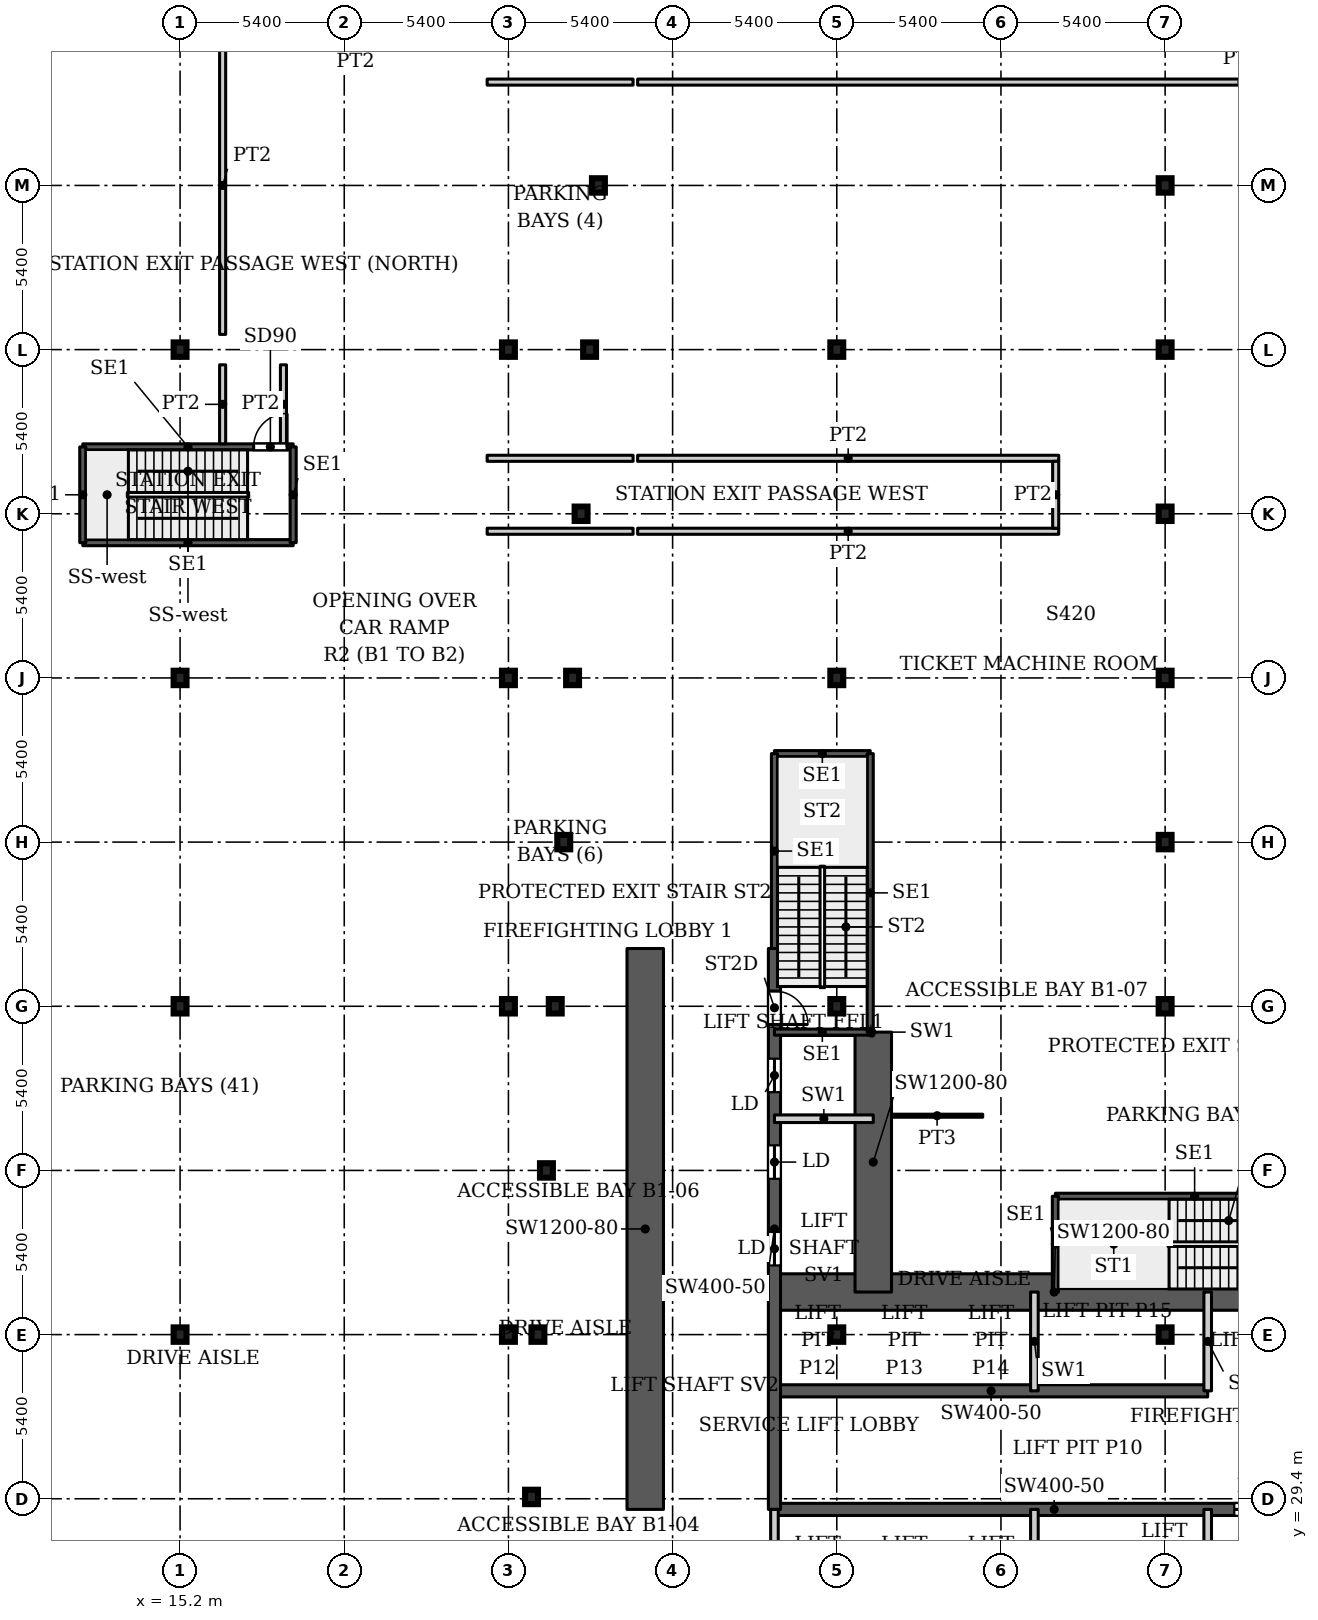
"""IFC4 building model, lengths in metres.
Left out: names, types, materials, properties, quantities, classifications, styles, units other than length and angle.
Written with IfcOpenShell. Run it as: python <this file> out.ifc"""

import sys

from ifc_helpers import new_model, si_unit, direction, frame, frame_2d, origin, origin_2d, place, context, subcontext, project, spatial, rectangle, i_section, extrude, source, transform, mapped, element, fill, save


model = new_model("IFC4")
c1 = context("Model", 3, precision=1e-05, world=origin(), true_north=direction((0.0, 1.0)))
c2 = subcontext(c1, "Body", "Model", "MODEL_VIEW")
j1 = project(units=[si_unit("LENGTHUNIT", "METRE"), si_unit("PLANEANGLEUNIT", "RADIAN")], contexts=[c1])
p1 = place(None, origin())
s1 = spatial("IfcSite", under=j1, at=p1, CompositionType="ELEMENT")
p2 = place(p1, origin())
s2 = spatial("IfcBuilding", under=s1, at=p2, CompositionType="ELEMENT")
p3 = place(p2, frame((0.0, 0.0, -5.0)))
s3 = spatial("IfcBuildingStorey", under=s2, at=p3, CompositionType="ELEMENT", Elevation=-5.0)
for number, where, z_axis, x_axis in (
    (1, (15.2, 34.8, 0.0), (0.0, 0.0, 1.0), (1.0, 0.0, 0.0)),
    (2, (26.0, 34.8, 0.0), (0.0, 0.0, 1.0), (1.0, 0.0, 0.0)),
    (3, (36.8, 34.8, 0.0), (0.0, 0.0, 1.0), (1.0, 0.0, 0.0)),
    (4, (47.6, 34.8, 0.0), (0.0, 0.0, 1.0), (1.0, 0.0, 0.0)),
    (5, (15.2, 45.6, 0.0), (0.0, 0.0, 1.0), (1.0, 0.0, 0.0)),
    (6, (26.0, 45.6, 0.0), (0.0, 0.0, 1.0), (1.0, 0.0, 0.0)),
    (7, (36.8, 45.6, 0.0), (0.0, 0.0, 1.0), (1.0, 0.0, 0.0)),
    (8, (47.6, 45.6, 0.0), (0.0, 0.0, 1.0), (1.0, 0.0, 0.0)),
    (9, (15.2, 56.4, 0.0), (0.0, 0.0, 1.0), (1.0, 0.0, 0.0)),
    (10, (26.0, 56.4, 0.0), (0.0, 0.0, 1.0), (1.0, 0.0, 0.0)),
    (11, (36.8, 56.4, 0.0), (0.0, 0.0, 1.0), (1.0, 0.0, 0.0)),
    (12, (47.6, 56.4, 0.0), (0.0, 0.0, 1.0), (1.0, 0.0, 0.0)),
    (13, (15.2, 67.2, 0.0), (0.0, 0.0, 1.0), (1.0, 0.0, 0.0)),
    (14, (26.0, 67.2, 0.0), (0.0, 0.0, 1.0), (1.0, 0.0, 0.0)),
    (15, (36.8, 67.2, 0.0), (0.0, 0.0, 1.0), (1.0, 0.0, 0.0)),
    (16, (47.6, 67.2, 0.0), (0.0, 0.0, 1.0), (1.0, 0.0, 0.0)),
    (17, (26.76, 29.46, 0.0), (0.0, 0.0, 1.0), (1.0, 0.0, 0.0)),
    (18, (26.97, 34.8, 0.0), (0.0, 0.0, 1.0), (1.0, 0.0, 0.0)),
    (19, (27.25, 40.2, 0.0), (0.0, 0.0, 1.0), (1.0, 0.0, 0.0)),
    (20, (27.54, 45.6, 0.0), (0.0, 0.0, 1.0), (1.0, 0.0, 0.0)),
    (21, (27.82, 51.0, 0.0), (0.0, 0.0, 1.0), (1.0, 0.0, 0.0)),
    (22, (47.6, 51.0, 0.0), (0.0, 0.0, 1.0), (1.0, 0.0, 0.0)),
    (23, (28.11, 56.4, 0.0), (0.0, 0.0, 1.0), (1.0, 0.0, 0.0)),
    (24, (28.39, 61.8, 0.0), (0.0, 0.0, 1.0), (1.0, 0.0, 0.0)),
    (25, (47.6, 61.8, 0.0), (0.0, 0.0, 1.0), (1.0, 0.0, 0.0)),
    (26, (28.67, 67.2, 0.0), (0.0, 0.0, 1.0), (1.0, 0.0, 0.0)),
    (27, (28.96, 72.6, 0.0), (0.0, 0.0, 1.0), (1.0, 0.0, 0.0)),
    (28, (47.6, 72.6, 0.0), (0.0, 0.0, 1.0), (1.0, 0.0, 0.0)),
):
    element("IfcColumn", number, at=place(p3, frame(where, z_axis=z_axis, x_axis=x_axis)), inside=s3, PredefinedType="COLUMN", context=c2, shape_type="SweptSolid", body=[
        extrude(i_section(OverallWidth=0.424, OverallDepth=0.474, WebThickness=0.048, FlangeThickness=0.077, FilletRadius=0.014, at=origin_2d()), origin(), (0.0, 0.0, 1.0), 5.0),
    ])
p4 = place(p3, frame((34.75, 29.05, 0.0), z_axis=(0.0, 0.0, 1.0), x_axis=(1.0, 0.0, 0.0)))
e29 = element("IfcWall", 29, at=p4, inside=s3, PredefinedType="SHEAR", context=c2, shape_type="SweptSolid", body=[
    extrude(rectangle(XDim=18.4, YDim=0.4, at=frame_2d((9.2, 0.0))), origin(), (0.0, 0.0, 1.0), 5.0),
])
p5 = place(p4, frame((15.125, 0.0, 0.0)))
e30 = element("IfcOpeningElement", 30, at=p5, cuts=e29, PredefinedType="OPENING", context=c2, shape_type="SweptSolid", body=[
    extrude(rectangle(XDim=1.1, YDim=2.2, at=frame_2d((0.55, 1.1))), frame((0.0, 0.21, 0.0), z_axis=(0.0, -1.0, 0.0), x_axis=(1.0, 0.0, 0.0)), (0.0, 0.0, 1.0), 0.42),
])
p6 = place(p3, frame((34.75, 32.95, 0.0), z_axis=(0.0, 0.0, 1.0), x_axis=(1.0, 0.0, 0.0)))
e31 = element("IfcWall", 31, at=p6, inside=s3, PredefinedType="SHEAR", context=c2, shape_type="SweptSolid", body=[
    extrude(rectangle(XDim=14.25, YDim=0.4, at=frame_2d((7.125, 0.0))), origin(), (0.0, 0.0, 1.0), 5.0),
])
p7 = place(p3, frame((34.75, 36.2, 0.0), z_axis=(0.0, 0.0, 1.0), x_axis=(1.0, 0.0, 0.0)))
e32 = element("IfcWall", 32, at=p7, inside=s3, PredefinedType="SHEAR", context=c2, shape_type="SweptSolid", body=[
    extrude(rectangle(XDim=18.4, YDim=1.2, at=frame_2d((9.2, 0.0))), origin(), (0.0, 0.0, 1.0), 5.0),
])
p8 = place(p7, frame((16.955, 0.0, 0.0)))
e33 = element("IfcOpeningElement", 33, at=p8, cuts=e32, PredefinedType="OPENING", context=c2, shape_type="SweptSolid", body=[
    extrude(rectangle(XDim=0.843, YDim=2.2, at=frame_2d((0.421, 1.1))), frame((0.0, 0.61, 0.0), z_axis=(0.0, -1.0, 0.0), x_axis=(1.0, 0.0, 0.0)), (0.0, 0.0, 1.0), 1.22),
])
p9 = place(p3, frame((34.75, 29.05, 0.0), z_axis=(0.0, 0.0, 1.0), x_axis=(0.0, 1.0, 0.0)))
e34 = element("IfcWall", 34, at=p9, inside=s3, PredefinedType="SHEAR", context=c2, shape_type="SweptSolid", body=[
    extrude(rectangle(XDim=18.45, YDim=0.4, at=frame_2d((9.225, 0.0))), origin(), (0.0, 0.0, 1.0), 5.0),
])
p10 = place(p9, frame((8.025, 0.0, 0.0)))
e35 = element("IfcOpeningElement", 35, at=p10, cuts=e34, PredefinedType="OPENING", context=c2, shape_type="SweptSolid", body=[
    extrude(rectangle(XDim=1.1, YDim=2.2, at=frame_2d((0.55, 1.1))), frame((0.0, 0.21, 0.0), z_axis=(0.0, -1.0, 0.0), x_axis=(1.0, 0.0, 0.0)), (0.0, 0.0, 1.0), 0.42),
])
p11 = place(p9, frame((10.875, 0.0, 0.0)))
e36 = element("IfcOpeningElement", 36, at=p11, cuts=e34, PredefinedType="OPENING", context=c2, shape_type="SweptSolid", body=[
    extrude(rectangle(XDim=1.1, YDim=2.2, at=frame_2d((0.55, 1.1))), frame((0.0, 0.21, 0.0), z_axis=(0.0, -1.0, 0.0), x_axis=(1.0, 0.0, 0.0)), (0.0, 0.0, 1.0), 0.42),
])
p12 = place(p9, frame((13.725, 0.0, 0.0)))
e37 = element("IfcOpeningElement", 37, at=p12, cuts=e34, PredefinedType="OPENING", context=c2, shape_type="SweptSolid", body=[
    extrude(rectangle(XDim=1.1, YDim=2.2, at=frame_2d((0.55, 1.1))), frame((0.0, 0.21, 0.0), z_axis=(0.0, -1.0, 0.0), x_axis=(1.0, 0.0, 0.0)), (0.0, 0.0, 1.0), 0.42),
])
p13 = place(p9, frame((15.95, 0.0, 0.0)))
e38 = element("IfcOpeningElement", 38, at=p13, cuts=e34, PredefinedType="OPENING", context=c2, shape_type="SweptSolid", body=[
    extrude(rectangle(XDim=1.1, YDim=2.2, at=frame_2d((0.55, 1.1))), frame((0.0, 0.21, 0.0), z_axis=(0.0, -1.0, 0.0), x_axis=(1.0, 0.0, 0.0)), (0.0, 0.0, 1.0), 0.42),
])
p14 = place(p3, frame((38.0, 36.2, 0.0), z_axis=(0.0, 0.0, 1.0), x_axis=(0.0, 1.0, 0.0)))
e39 = element("IfcWall", 39, at=p14, inside=s3, PredefinedType="SHEAR", context=c2, shape_type="SweptSolid", body=[
    extrude(rectangle(XDim=8.55, YDim=1.2, at=frame_2d((4.275, 0.0))), origin(), (0.0, 0.0, 1.0), 5.0),
])
p15 = place(p3, frame((30.5, 29.05, 0.0), z_axis=(0.0, 0.0, 1.0), x_axis=(0.0, 1.0, 0.0)))
e40 = element("IfcWall", 40, at=p15, inside=s3, PredefinedType="SHEAR", context=c2, shape_type="SweptSolid", body=[
    extrude(rectangle(XDim=18.45, YDim=1.2, at=frame_2d((9.225, 0.0))), origin(), (0.0, 0.0, 1.0), 5.0),
])
p16 = place(p3, frame((43.99, 39.35, 0.0), z_axis=(0.0, 0.0, 1.0), x_axis=(1.0, 0.0, 0.0)))
e41 = element("IfcWall", 41, at=p16, inside=s3, PredefinedType="SHEAR", context=c2, shape_type="SweptSolid", body=[
    extrude(rectangle(XDim=9.16, YDim=0.2, at=frame_2d((4.58, 0.0))), origin(), (0.0, 0.0, 1.0), 5.0),
])
p17 = place(p3, frame((43.99, 36.2, 0.0), z_axis=(0.0, 0.0, 1.0), x_axis=(0.0, 1.0, 0.0)))
e42 = element("IfcWall", 42, at=p17, inside=s3, PredefinedType="SHEAR", context=c2, shape_type="SweptSolid", body=[
    extrude(rectangle(XDim=3.15, YDim=0.2, at=frame_2d((1.575, 0.0))), origin(), (0.0, 0.0, 1.0), 5.0),
])
for number, where, z_axis, x_axis in (
    (43, (34.75, 44.75, 0.0), (0.0, 0.0, 1.0), (1.0, 0.0, 0.0)),
    (44, (34.75, 53.91, 0.0), (0.0, 0.0, 1.0), (1.0, 0.0, 0.0)),
):
    element("IfcWall", number, at=place(p3, frame(where, z_axis=z_axis, x_axis=x_axis)), inside=s3, PredefinedType="SHEAR", context=c2, shape_type="SweptSolid", body=[
        extrude(rectangle(XDim=3.15, YDim=0.2, at=frame_2d((1.575, 0.0))), origin(), (0.0, 0.0, 1.0), 5.0),
    ])
p18 = place(p3, frame((34.75, 47.5, 0.0), z_axis=(0.0, 0.0, 1.0), x_axis=(0.0, 1.0, 0.0)))
e45 = element("IfcWall", 45, at=p18, inside=s3, PredefinedType="SHEAR", context=c2, shape_type="SweptSolid", body=[
    extrude(rectangle(XDim=6.41, YDim=0.2, at=frame_2d((3.205, 0.0))), origin(), (0.0, 0.0, 1.0), 5.0),
])
p19 = place(p3, frame((37.9, 44.75, 0.0), z_axis=(0.0, 0.0, 1.0), x_axis=(0.0, 1.0, 0.0)))
e46 = element("IfcWall", 46, at=p19, inside=s3, PredefinedType="SHEAR", context=c2, shape_type="SweptSolid", body=[
    extrude(rectangle(XDim=9.16, YDim=0.2, at=frame_2d((4.58, 0.0))), origin(), (0.0, 0.0, 1.0), 5.0),
])
for number, where, z_axis, x_axis in (
    (47, (34.75, 25.8, 0.0), (0.0, 0.0, 1.0), (0.0, 1.0, 0.0)),
    (48, (43.3, 25.8, 0.0), (0.0, 0.0, 1.0), (0.0, 1.0, 0.0)),
    (49, (43.3, 32.95, 0.0), (0.0, 0.0, 1.0), (0.0, 1.0, 0.0)),
    (50, (49.0, 25.8, 0.0), (0.0, 0.0, 1.0), (0.0, 1.0, 0.0)),
    (51, (49.0, 32.95, 0.0), (0.0, 0.0, 1.0), (0.0, 1.0, 0.0)),
    (52, (34.75, 41.9, 0.0), (0.0, 0.0, 1.0), (1.0, 0.0, 0.0)),
):
    element("IfcWall", number, at=place(p3, frame(where, z_axis=z_axis, x_axis=x_axis)), inside=s3, PredefinedType="PARTITIONING", context=c2, shape_type="SweptSolid", body=[
        extrude(rectangle(XDim=3.25, YDim=0.25, at=frame_2d((1.625, 0.0))), origin(), (0.0, 0.0, 1.0), 5.0),
    ])
p20 = place(p3, frame((37.9, 44.75, 0.0), z_axis=(0.0, 0.0, 1.0), x_axis=(1.0, 0.0, 0.0)))
e53 = element("IfcWall", 53, at=p20, inside=s3, PredefinedType="PARTITIONING", context=c2, shape_type="SweptSolid", body=[
    extrude(rectangle(XDim=0.1, YDim=0.25, at=frame_2d((0.05, 0.0))), origin(), (0.0, 0.0, 1.0), 5.0),
])
p21 = place(p3, frame((12.0, 60.85, 0.0), z_axis=(0.0, 0.0, 1.0), x_axis=(1.0, 0.0, 0.0)))
e54 = element("IfcWall", 54, at=p21, inside=s3, PredefinedType="SHEAR", context=c2, shape_type="SweptSolid", body=[
    extrude(rectangle(XDim=6.92, YDim=0.2, at=frame_2d((3.46, 0.0))), origin(), (0.0, 0.0, 1.0), 5.0),
])
p22 = place(p3, frame((12.0, 64.0, 0.0), z_axis=(0.0, 0.0, 1.0), x_axis=(1.0, 0.0, 0.0)))
e55 = element("IfcWall", 55, at=p22, inside=s3, PredefinedType="SHEAR", context=c2, shape_type="SweptSolid", body=[
    extrude(rectangle(XDim=6.92, YDim=0.2, at=frame_2d((3.46, 0.0))), origin(), (0.0, 0.0, 1.0), 5.0),
])
p23 = place(p22, frame((5.62, 0.0, 0.0)))
e56 = element("IfcOpeningElement", 56, at=p23, cuts=e55, PredefinedType="OPENING", context=c2, shape_type="SweptSolid", body=[
    extrude(rectangle(XDim=1.1, YDim=2.2, at=frame_2d((0.55, 1.1))), frame((0.0, 0.11, 0.0), z_axis=(0.0, -1.0, 0.0), x_axis=(1.0, 0.0, 0.0)), (0.0, 0.0, 1.0), 0.22),
])
for number, where, z_axis, x_axis in (
    (57, (12.0, 60.85, 0.0), (0.0, 0.0, 1.0), (0.0, 1.0, 0.0)),
    (58, (18.92, 60.85, 0.0), (0.0, 0.0, 1.0), (0.0, 1.0, 0.0)),
):
    element("IfcWall", number, at=place(p3, frame(where, z_axis=z_axis, x_axis=x_axis)), inside=s3, PredefinedType="SHEAR", context=c2, shape_type="SweptSolid", body=[
        extrude(rectangle(XDim=3.15, YDim=0.2, at=frame_2d((1.575, 0.0))), origin(), (0.0, 0.0, 1.0), 5.0),
    ])
p24 = place(p3, frame((16.6, 64.1, 0.0), z_axis=(0.0, 0.0, 1.0), x_axis=(0.0, 1.0, 0.0)))
e59 = element("IfcWall", 59, at=p24, inside=s3, PredefinedType="PARTITIONING", context=c2, shape_type="SweptSolid", body=[
    extrude(rectangle(XDim=2.6, YDim=0.2, at=frame_2d((1.3, 0.0))), origin(), (0.0, 0.0, 1.0), 4.58),
])
p25 = place(p3, frame((16.6, 67.7, 0.0), z_axis=(0.0, 0.0, 1.0), x_axis=(0.0, 1.0, 0.0)))
e60 = element("IfcWall", 60, at=p25, inside=s3, PredefinedType="PARTITIONING", context=c2, shape_type="SweptSolid", body=[
    extrude(rectangle(XDim=9.8, YDim=0.2, at=frame_2d((4.9, 0.0))), origin(), (0.0, 0.0, 1.0), 4.58),
])
p26 = place(p3, frame((18.6, 64.1, 0.0), z_axis=(0.0, 0.0, 1.0), x_axis=(0.0, 1.0, 0.0)))
e61 = element("IfcWall", 61, at=p26, inside=s3, PredefinedType="PARTITIONING", context=c2, shape_type="SweptSolid", body=[
    extrude(rectangle(XDim=2.6, YDim=0.2, at=frame_2d((1.3, 0.0))), origin(), (0.0, 0.0, 1.0), 4.58),
])
for number, where, z_axis, x_axis in (
    (62, (25.3, 61.225, 0.0), (0.0, 0.0, 1.0), (1.0, 0.0, 0.0)),
    (63, (25.3, 63.625, 0.0), (0.0, 0.0, 1.0), (1.0, 0.0, 0.0)),
    (64, (25.3, 76.0, 0.0), (0.0, 0.0, 1.0), (1.0, 0.0, 0.0)),
):
    element("IfcWall", number, at=place(p3, frame(where, z_axis=z_axis, x_axis=x_axis)), inside=s3, PredefinedType="PARTITIONING", context=c2, shape_type="SweptSolid", body=[
        extrude(rectangle(XDim=4.8, YDim=0.2, at=frame_2d((2.4, 0.0))), origin(), (0.0, 0.0, 1.0), 4.58),
    ])
for number, where, z_axis, x_axis in (
    (65, (30.25, 61.225, 0.0), (0.0, 0.0, 1.0), (1.0, 0.0, 0.0)),
    (66, (30.25, 63.625, 0.0), (0.0, 0.0, 1.0), (1.0, 0.0, 0.0)),
):
    element("IfcWall", number, at=place(p3, frame(where, z_axis=z_axis, x_axis=x_axis)), inside=s3, PredefinedType="PARTITIONING", context=c2, shape_type="SweptSolid", body=[
        extrude(rectangle(XDim=13.85, YDim=0.2, at=frame_2d((6.925, 0.0))), origin(), (0.0, 0.0, 1.0), 4.58),
    ])
p27 = place(p3, frame((30.25, 76.0, 0.0), z_axis=(0.0, 0.0, 1.0), x_axis=(1.0, 0.0, 0.0)))
e67 = element("IfcWall", 67, at=p27, inside=s3, PredefinedType="PARTITIONING", context=c2, shape_type="SweptSolid", body=[
    extrude(rectangle(XDim=39.75, YDim=0.2, at=frame_2d((19.875, 0.0))), origin(), (0.0, 0.0, 1.0), 4.58),
])
p28 = place(p27, frame((31.45, 0.0, 0.0)))
e68 = element("IfcOpeningElement", 68, at=p28, cuts=e67, PredefinedType="OPENING", context=c2, shape_type="SweptSolid", body=[
    extrude(rectangle(XDim=2.4, YDim=2.1, at=frame_2d((1.2, 1.05))), frame((0.0, 0.11, 0.0), z_axis=(0.0, -1.0, 0.0), x_axis=(1.0, 0.0, 0.0)), (0.0, 0.0, 1.0), 0.22),
])
p29 = place(p3, frame((38.599, 42.0, 0.0), z_axis=(0.0, 0.0, 1.0), x_axis=(1.0, 0.0, 0.0)))
e69 = element("IfcWall", 69, at=p29, inside=s3, PredefinedType="PARTITIONING", context=c2, shape_type="SweptSolid", body=[
    extrude(rectangle(XDim=3.001, YDim=0.1, at=frame_2d((1.5, 0.0))), origin(), (0.0, 0.0, 1.0), 4.58),
])
p30 = place(p3, frame((44.0, 61.325, 0.0), z_axis=(0.0, 0.0, 1.0), x_axis=(0.0, 1.0, 0.0)))
e70 = element("IfcWall", 70, at=p30, inside=s3, PredefinedType="PARTITIONING", context=c2, shape_type="SweptSolid", body=[
    extrude(rectangle(XDim=2.2, YDim=0.2, at=frame_2d((1.1, 0.0))), origin(), (0.0, 0.0, 1.0), 4.58),
])
m1 = source(origin(), c2, "Body", "SweptSolid", [
    extrude(rectangle(XDim=1.1, YDim=2.2, at=frame_2d((0.55, 1.1))), frame((0.0, 0.025, 0.0), z_axis=(0.0, -1.0, 0.0), x_axis=(1.0, 0.0, 0.0)), (0.0, 0.0, 1.0), 0.05),
])
p31 = place(p10, origin())
e71 = element("IfcDoor", 71, at=p31, inside=s3, OperationType="SLIDING_TO_LEFT", PredefinedType="DOOR", context=c2, shape_type="MappedRepresentation", body=[
    mapped(m1, transform((0.0, 0.0, 0.0), x_axis=(1.0, 0.0, 0.0), y_axis=(0.0, 1.0, 0.0), z_axis=(0.0, 0.0, 1.0), scale=1.0)),
])
fill(e35, e71)
p32 = place(p11, origin())
e72 = element("IfcDoor", 72, at=p32, inside=s3, OperationType="SLIDING_TO_LEFT", PredefinedType="DOOR", context=c2, shape_type="MappedRepresentation", body=[
    mapped(m1, transform((0.0, 0.0, 0.0), x_axis=(1.0, 0.0, 0.0), y_axis=(0.0, 1.0, 0.0), z_axis=(0.0, 0.0, 1.0), scale=1.0)),
])
fill(e36, e72)
p33 = place(p12, origin())
e73 = element("IfcDoor", 73, at=p33, inside=s3, OperationType="SLIDING_TO_LEFT", PredefinedType="DOOR", context=c2, shape_type="MappedRepresentation", body=[
    mapped(m1, transform((0.0, 0.0, 0.0), x_axis=(1.0, 0.0, 0.0), y_axis=(0.0, 1.0, 0.0), z_axis=(0.0, 0.0, 1.0), scale=1.0)),
])
fill(e37, e73)
p34 = place(p5, origin())
e74 = element("IfcDoor", 74, at=p34, inside=s3, OperationType="SLIDING_TO_LEFT", PredefinedType="DOOR", context=c2, shape_type="MappedRepresentation", body=[
    mapped(m1, transform((0.0, 0.0, 0.0), x_axis=(1.0, 0.0, 0.0), y_axis=(0.0, 1.0, 0.0), z_axis=(0.0, 0.0, 1.0), scale=1.0)),
])
fill(e30, e74)
m2 = source(origin(), c2, "Body", "SweptSolid", [
    extrude(rectangle(XDim=1.1, YDim=2.2, at=frame_2d((0.55, 1.1))), frame((0.0, 0.025, 0.0), z_axis=(0.0, -1.0, 0.0), x_axis=(1.0, 0.0, 0.0)), (0.0, 0.0, 1.0), 0.05),
])
p35 = place(p13, origin())
e75 = element("IfcDoor", 75, at=p35, inside=s3, OperationType="SINGLE_SWING_RIGHT", PredefinedType="DOOR", context=c2, shape_type="MappedRepresentation", body=[
    mapped(m2, transform((0.0, 0.0, 0.0), x_axis=(1.0, 0.0, 0.0), y_axis=(0.0, 1.0, 0.0), z_axis=(0.0, 0.0, 1.0), scale=1.0)),
])
fill(e38, e75)
p36 = place(p23, origin())
e76 = element("IfcDoor", 76, at=p36, inside=s3, OperationType="SINGLE_SWING_LEFT", PredefinedType="DOOR", context=c2, shape_type="MappedRepresentation", body=[
    mapped(m2, transform((0.0, 0.0, 0.0), x_axis=(1.0, 0.0, 0.0), y_axis=(0.0, 1.0, 0.0), z_axis=(0.0, 0.0, 1.0), scale=1.0)),
])
fill(e56, e76)
save(model, sys.argv[1])
